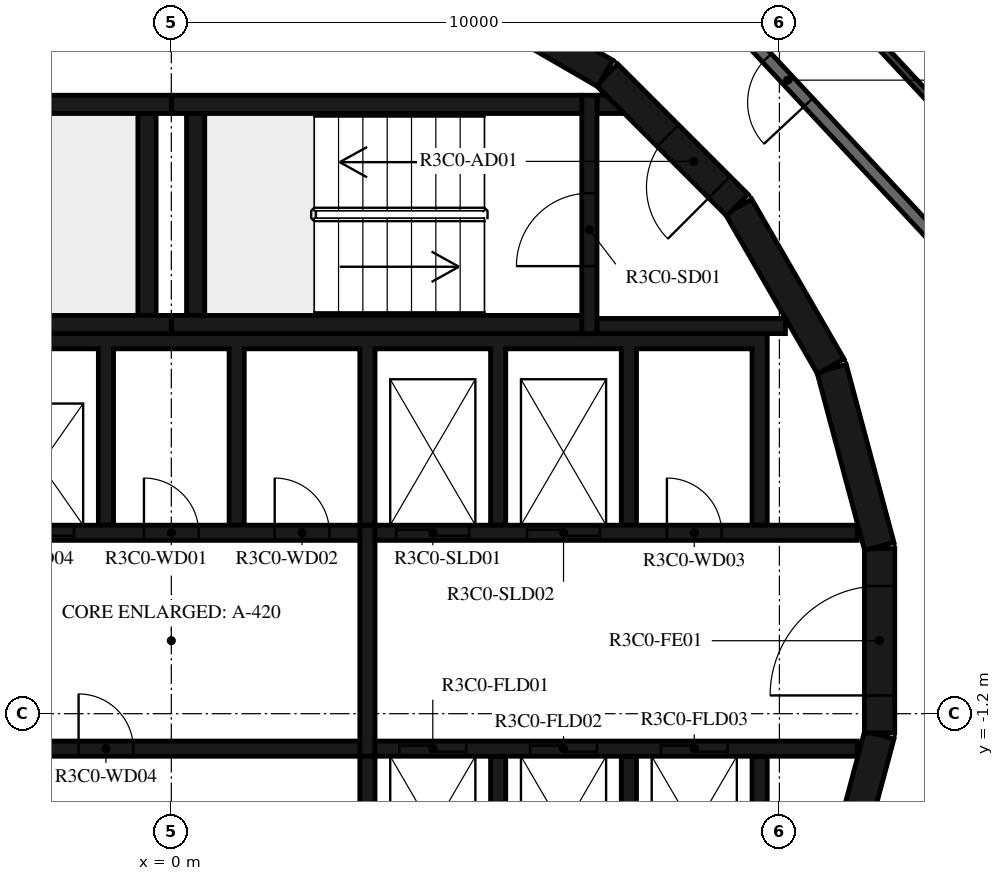
"""IFC4 building model, lengths in metres.
Left out: names, types, materials, properties, quantities, classifications, styles, units other than length and angle.
Written with IfcOpenShell. Run it as: python <this file> out.ifc"""

import sys

from ifc_helpers import new_model, si_unit, direction, frame, frame_2d, origin, place, context, subcontext, project, spatial, polyline, rectangle, outline, extrude, element, fill, save


model = new_model("IFC4")
c1 = context("Model", 3, precision=1e-05, world=origin(), true_north=direction((0.0, 1.0)))
c2 = subcontext(c1, "Body", "Model", "MODEL_VIEW")
j1 = project(units=[si_unit("LENGTHUNIT", "METRE"), si_unit("PLANEANGLEUNIT", "RADIAN")], contexts=[c1])
p1 = place(None, origin())
s1 = spatial("IfcSite", under=j1, at=p1, CompositionType="ELEMENT")
p2 = place(p1, origin())
s2 = spatial("IfcBuilding", under=s1, at=p2, CompositionType="ELEMENT")
p3 = place(p2, frame((0.0, 0.0, 134.4)))
s3 = spatial("IfcBuildingStorey", under=s2, at=p3, CompositionType="ELEMENT", Elevation=134.4)
p4 = place(p3, frame((10.858, -4.479, 0.0), z_axis=(0.0, 0.0, 1.0), x_axis=(0.258734743916, 0.965948410781, 0.0)))
e1 = element("IfcWall", 1, at=p4, inside=s3, PredefinedType="SHEAR", context=c2, shape_type="SweptSolid", body=[
    extrude(rectangle(XDim=3.033, YDim=0.5, at=frame_2d((1.516, 0.0))), origin(), (0.0, 0.0, 1.0), 3.12),
])
p5 = place(p3, frame((11.647, -1.516, 0.0), z_axis=(0.0, 0.0, 1.0), x_axis=(0.0, 1.0, 0.0)))
e2 = element("IfcWall", 2, at=p5, inside=s3, PredefinedType="SHEAR", context=c2, shape_type="SweptSolid", body=[
    extrude(rectangle(XDim=3.033, YDim=0.5, at=frame_2d((1.516, 0.0))), origin(), (0.0, 0.0, 1.0), 3.12),
])
p6 = place(p5, frame((0.616, 0.0, 0.0)))
e3 = element("IfcOpeningElement", 3, at=p6, cuts=e2, PredefinedType="OPENING", context=c2, shape_type="SweptSolid", body=[
    extrude(rectangle(XDim=1.8, YDim=2.1, at=frame_2d((0.9, 1.05))), frame((0.0, 0.26, 0.0), z_axis=(0.0, -1.0, 0.0), x_axis=(1.0, 0.0, 0.0)), (0.0, 0.0, 1.0), 0.52),
])
for number, where, z_axis, x_axis in (
    (4, (11.643, 1.55, 0.0), (0.0, 0.0, 1.0), (-0.259, 0.966, 0.0)),
    (5, (10.845, 4.51, 0.0), (0.0, 0.0, 1.0), (-0.5, 0.866, 0.0)),
):
    element("IfcWall", number, at=place(p3, frame(where, z_axis=z_axis, x_axis=x_axis)), inside=s3, PredefinedType="SHEAR", context=c2, shape_type="SweptSolid", body=[
        extrude(rectangle(XDim=3.033, YDim=0.5, at=frame_2d((1.516, 0.0))), origin(), (0.0, 0.0, 1.0), 3.12),
    ])
p7 = place(p3, frame((9.308, 7.164, 0.0), z_axis=(0.0, 0.0, 1.0), x_axis=(-0.707106781187, 0.707106781187, 0.0)))
e6 = element("IfcWall", 6, at=p7, inside=s3, PredefinedType="SHEAR", context=c2, shape_type="SweptSolid", body=[
    extrude(rectangle(XDim=3.032, YDim=0.5, at=frame_2d((1.516, 0.0))), origin(), (0.0, 0.0, 1.0), 3.12),
])
p8 = place(p7, frame((0.416, 0.0, 0.0)))
e7 = element("IfcOpeningElement", 7, at=p8, cuts=e6, PredefinedType="OPENING", context=c2, shape_type="SweptSolid", body=[
    extrude(rectangle(XDim=1.2, YDim=2.1, at=frame_2d((0.6, 1.05))), frame((0.0, 0.26, 0.0), z_axis=(0.0, -1.0, 0.0), x_axis=(1.0, 0.0, 0.0)), (0.0, 0.0, 1.0), 0.52),
])
p9 = place(p3, frame((7.137, 9.329, 0.0), z_axis=(0.0, 0.0, 1.0), x_axis=(-0.865975092491, 0.500087131594, 0.0)))
e8 = element("IfcWall", 8, at=p9, inside=s3, PredefinedType="SHEAR", context=c2, shape_type="SweptSolid", body=[
    extrude(rectangle(XDim=3.033, YDim=0.5, at=frame_2d((1.516, 0.0))), origin(), (0.0, 0.0, 1.0), 3.12),
])
for number, where, z_axis, x_axis in (
    (9, (0.0, 5.2, 0.0), (0.0, 0.0, 1.0), (1.0, 0.0, 0.0)),
    (10, (0.0, 8.82, 0.0), (0.0, 0.0, 1.0), (1.0, 0.0, 0.0)),
):
    element("IfcWall", number, at=place(p3, frame(where, z_axis=z_axis, x_axis=x_axis)), inside=s3, PredefinedType="SHEAR", context=c2, shape_type="SweptSolid", body=[
        extrude(rectangle(XDim=6.75, YDim=0.3, at=frame_2d((3.375, 0.0))), origin(), (0.0, 0.0, 1.0), 3.12),
    ])
p10 = place(p3, frame((0.4, 5.35, 0.0), z_axis=(0.0, 0.0, 1.0), x_axis=(0.0, 1.0, 0.0)))
e11 = element("IfcWall", 11, at=p10, inside=s3, PredefinedType="SHEAR", context=c2, shape_type="SweptSolid", body=[
    extrude(rectangle(XDim=3.32, YDim=0.3, at=frame_2d((1.66, 0.0))), origin(), (0.0, 0.0, 1.0), 3.12),
])
p11 = place(p3, frame((6.875, 5.05, 0.0), z_axis=(0.0, 0.0, 1.0), x_axis=(0.0, 1.0, 0.0)))
e12 = element("IfcWall", 12, at=p11, inside=s3, PredefinedType="SHEAR", context=c2, shape_type="SweptSolid", body=[
    extrude(rectangle(XDim=3.92, YDim=0.25, at=frame_2d((1.96, 0.0))), origin(), (0.0, 0.0, 1.0), 3.12),
])
p12 = place(p11, frame((1.11, 0.0, 0.0)))
e13 = element("IfcOpeningElement", 13, at=p12, cuts=e12, PredefinedType="OPENING", context=c2, shape_type="SweptSolid", body=[
    extrude(rectangle(XDim=1.2, YDim=2.1, at=frame_2d((0.6, 1.05))), frame((0.0, 0.135, 0.0), z_axis=(0.0, -1.0, 0.0), x_axis=(1.0, 0.0, 0.0)), (0.0, 0.0, 1.0), 0.27),
])
p13 = place(p3, frame((7.0, 5.175, 0.0), z_axis=(0.0, 0.0, 1.0), x_axis=(1.0, 0.0, 0.0)))
e14 = element("IfcWall", 14, at=p13, inside=s3, PredefinedType="SHEAR", context=c2, shape_type="SweptSolid", body=[
    extrude(rectangle(XDim=3.1, YDim=0.25, at=frame_2d((1.55, 0.0))), origin(), (0.0, 0.0, 1.0), 3.12),
])
p14 = place(p3, origin())
e15 = element("IfcWall", 15, at=p14, inside=s3, PredefinedType="SHEAR", context=c2, shape_type="SweptSolid", body=[
    extrude(outline(polyline([(7.448, 8.67), (7.0, 8.67), (7.0, 8.97), (7.148, 8.97), (7.448, 8.67)])), origin(), (0.0, 0.0, 1.0), 3.12),
])
for number, where, z_axis, x_axis in (
    (16, (-6.75, 5.2, 0.0), (0.0, 0.0, 1.0), (1.0, 0.0, 0.0)),
    (17, (-6.75, 8.82, 0.0), (0.0, 0.0, 1.0), (1.0, 0.0, 0.0)),
):
    element("IfcWall", number, at=place(p3, frame(where, z_axis=z_axis, x_axis=x_axis)), inside=s3, PredefinedType="SHEAR", context=c2, shape_type="SweptSolid", body=[
        extrude(rectangle(XDim=6.75, YDim=0.3, at=frame_2d((3.375, 0.0))), origin(), (0.0, 0.0, 1.0), 3.12),
    ])
p15 = place(p3, frame((-0.4, 5.35, 0.0), z_axis=(0.0, 0.0, 1.0), x_axis=(0.0, 1.0, 0.0)))
e18 = element("IfcWall", 18, at=p15, inside=s3, PredefinedType="SHEAR", context=c2, shape_type="SweptSolid", body=[
    extrude(rectangle(XDim=3.32, YDim=0.3, at=frame_2d((1.66, 0.0))), origin(), (0.0, 0.0, 1.0), 3.12),
])
p16 = place(p3, origin())
e19 = element("IfcWall", 19, at=p16, inside=s3, PredefinedType="SHEAR", context=c2, shape_type="SweptSolid", body=[
    extrude(outline(polyline([(-9.55, 4.8), (-7.65, 4.8), (-7.65, 1.9), (-7.4, 1.9), (-7.4, 4.8), (-5.5, 4.8), (-5.5, 1.9), (-5.25, 1.9), (-5.25, 4.8), (-3.35, 4.8), (-3.35, 1.9), (-3.1, 1.9), (-3.1, 4.8), (-1.2, 4.8), (-1.2, 1.9), (-0.95, 1.9), (-0.95, 4.8), (0.95, 4.8), (0.95, 1.9), (1.2, 1.9), (1.2, 4.8), (3.1, 4.8), (3.1, 1.9), (3.35, 1.9), (3.35, 4.8), (5.25, 4.8), (5.25, 1.9), (5.5, 1.9), (5.5, 4.8), (7.4, 4.8), (7.4, 1.9), (7.65, 1.9), (7.65, 4.8), (9.55, 4.8), (9.55, 1.9), (9.8, 1.9), (9.8, 4.8), (9.8, 5.05), (-9.8, 5.05), (-9.8, 4.8), (-9.8, 1.9), (-9.55, 1.9), (-9.55, 4.8)])), origin(), (0.0, 0.0, 1.0), 3.12),
])
p17 = place(p3, origin())
e20 = element("IfcWall", 20, at=p17, inside=s3, PredefinedType="SHEAR", context=c2, shape_type="SweptSolid", body=[
    extrude(outline(polyline([(9.8, -5.05), (9.8, -4.8), (9.8, -1.9), (9.55, -1.9), (9.55, -4.8), (7.65, -4.8), (7.65, -1.9), (7.4, -1.9), (7.4, -4.8), (5.5, -4.8), (5.5, -1.9), (5.25, -1.9), (5.25, -4.8), (3.35, -4.8), (3.35, -1.9), (3.1, -1.9), (3.1, -4.8), (-5.25, -4.8), (-5.25, -1.9), (-5.5, -1.9), (-5.5, -4.8), (-7.4, -4.8), (-7.4, -1.9), (-7.65, -1.9), (-7.65, -4.8), (-9.55, -4.8), (-9.55, -1.9), (-9.8, -1.9), (-9.8, -4.8), (-9.8, -5.05), (9.8, -5.05)])), origin(), (0.0, 0.0, 1.0), 3.12),
])
p18 = place(p3, frame((-11.28, 1.775, 0.0), z_axis=(0.0, 0.0, 1.0), x_axis=(1.0, 0.0, 0.0)))
e21 = element("IfcWall", 21, at=p18, inside=s3, PredefinedType="SHEAR", context=c2, shape_type="SweptSolid", body=[
    extrude(rectangle(XDim=14.38, YDim=0.25, at=frame_2d((7.19, 0.0))), origin(), (0.0, 0.0, 1.0), 3.12),
])
p19 = place(p18, frame((2.13, 0.0, 0.0)))
e22 = element("IfcOpeningElement", 22, at=p19, cuts=e21, PredefinedType="OPENING", context=c2, shape_type="SweptSolid", body=[
    extrude(rectangle(XDim=1.1, YDim=2.1, at=frame_2d((0.55, 1.05))), frame((0.0, 0.135, 0.0), z_axis=(0.0, -1.0, 0.0), x_axis=(1.0, 0.0, 0.0)), (0.0, 0.0, 1.0), 0.27),
])
p20 = place(p18, frame((4.28, 0.0, 0.0)))
e23 = element("IfcOpeningElement", 23, at=p20, cuts=e21, PredefinedType="OPENING", context=c2, shape_type="SweptSolid", body=[
    extrude(rectangle(XDim=1.1, YDim=2.1, at=frame_2d((0.55, 1.05))), frame((0.0, 0.135, 0.0), z_axis=(0.0, -1.0, 0.0), x_axis=(1.0, 0.0, 0.0)), (0.0, 0.0, 1.0), 0.27),
])
p21 = place(p18, frame((6.43, 0.0, 0.0)))
e24 = element("IfcOpeningElement", 24, at=p21, cuts=e21, PredefinedType="OPENING", context=c2, shape_type="SweptSolid", body=[
    extrude(rectangle(XDim=1.1, YDim=2.1, at=frame_2d((0.55, 1.05))), frame((0.0, 0.135, 0.0), z_axis=(0.0, -1.0, 0.0), x_axis=(1.0, 0.0, 0.0)), (0.0, 0.0, 1.0), 0.27),
])
p22 = place(p18, frame((8.58, 0.0, 0.0)))
e25 = element("IfcOpeningElement", 25, at=p22, cuts=e21, PredefinedType="OPENING", context=c2, shape_type="SweptSolid", body=[
    extrude(rectangle(XDim=1.1, YDim=2.1, at=frame_2d((0.55, 1.05))), frame((0.0, 0.135, 0.0), z_axis=(0.0, -1.0, 0.0), x_axis=(1.0, 0.0, 0.0)), (0.0, 0.0, 1.0), 0.27),
])
p23 = place(p18, frame((10.83, 0.0, 0.0)))
e26 = element("IfcOpeningElement", 26, at=p23, cuts=e21, PredefinedType="OPENING", context=c2, shape_type="SweptSolid", body=[
    extrude(rectangle(XDim=0.9, YDim=2.1, at=frame_2d((0.45, 1.05))), frame((0.0, 0.135, 0.0), z_axis=(0.0, -1.0, 0.0), x_axis=(1.0, 0.0, 0.0)), (0.0, 0.0, 1.0), 0.27),
])
p24 = place(p18, frame((12.98, 0.0, 0.0)))
e27 = element("IfcOpeningElement", 27, at=p24, cuts=e21, PredefinedType="OPENING", context=c2, shape_type="SweptSolid", body=[
    extrude(rectangle(XDim=0.9, YDim=2.1, at=frame_2d((0.45, 1.05))), frame((0.0, 0.135, 0.0), z_axis=(0.0, -1.0, 0.0), x_axis=(1.0, 0.0, 0.0)), (0.0, 0.0, 1.0), 0.27),
])
p25 = place(p3, frame((3.35, 1.775, 0.0), z_axis=(0.0, 0.0, 1.0), x_axis=(1.0, 0.0, 0.0)))
e28 = element("IfcWall", 28, at=p25, inside=s3, PredefinedType="SHEAR", context=c2, shape_type="SweptSolid", body=[
    extrude(rectangle(XDim=7.93, YDim=0.25, at=frame_2d((3.965, 0.0))), origin(), (0.0, 0.0, 1.0), 3.12),
])
p26 = place(p25, frame((0.35, 0.0, 0.0)))
e29 = element("IfcOpeningElement", 29, at=p26, cuts=e28, PredefinedType="OPENING", context=c2, shape_type="SweptSolid", body=[
    extrude(rectangle(XDim=1.2, YDim=2.4, at=frame_2d((0.6, 1.2))), frame((0.0, 0.135, 0.0), z_axis=(0.0, -1.0, 0.0), x_axis=(1.0, 0.0, 0.0)), (0.0, 0.0, 1.0), 0.27),
])
p27 = place(p25, frame((2.5, 0.0, 0.0)))
e30 = element("IfcOpeningElement", 30, at=p27, cuts=e28, PredefinedType="OPENING", context=c2, shape_type="SweptSolid", body=[
    extrude(rectangle(XDim=1.2, YDim=2.4, at=frame_2d((0.6, 1.2))), frame((0.0, 0.135, 0.0), z_axis=(0.0, -1.0, 0.0), x_axis=(1.0, 0.0, 0.0)), (0.0, 0.0, 1.0), 0.27),
])
p28 = place(p25, frame((4.8, 0.0, 0.0)))
e31 = element("IfcOpeningElement", 31, at=p28, cuts=e28, PredefinedType="OPENING", context=c2, shape_type="SweptSolid", body=[
    extrude(rectangle(XDim=0.9, YDim=2.1, at=frame_2d((0.45, 1.05))), frame((0.0, 0.135, 0.0), z_axis=(0.0, -1.0, 0.0), x_axis=(1.0, 0.0, 0.0)), (0.0, 0.0, 1.0), 0.27),
])
p29 = place(p3, frame((-11.28, -1.775, 0.0), z_axis=(0.0, 0.0, 1.0), x_axis=(1.0, 0.0, 0.0)))
e32 = element("IfcWall", 32, at=p29, inside=s3, PredefinedType="SHEAR", context=c2, shape_type="SweptSolid", body=[
    extrude(rectangle(XDim=14.38, YDim=0.25, at=frame_2d((7.19, 0.0))), origin(), (0.0, 0.0, 1.0), 3.12),
])
p30 = place(p29, frame((9.755, 0.0, 0.0)))
e33 = element("IfcOpeningElement", 33, at=p30, cuts=e32, PredefinedType="OPENING", context=c2, shape_type="SweptSolid", body=[
    extrude(rectangle(XDim=0.9, YDim=2.1, at=frame_2d((0.45, 1.05))), frame((0.0, 0.135, 0.0), z_axis=(0.0, -1.0, 0.0), x_axis=(1.0, 0.0, 0.0)), (0.0, 0.0, 1.0), 0.27),
])
p31 = place(p3, frame((3.35, -1.775, 0.0), z_axis=(0.0, 0.0, 1.0), x_axis=(1.0, 0.0, 0.0)))
e34 = element("IfcWall", 34, at=p31, inside=s3, PredefinedType="SHEAR", context=c2, shape_type="SweptSolid", body=[
    extrude(rectangle(XDim=7.93, YDim=0.25, at=frame_2d((3.965, 0.0))), origin(), (0.0, 0.0, 1.0), 3.12),
])
p32 = place(p31, frame((0.4, 0.0, 0.0)))
e35 = element("IfcOpeningElement", 35, at=p32, cuts=e34, PredefinedType="OPENING", context=c2, shape_type="SweptSolid", body=[
    extrude(rectangle(XDim=1.1, YDim=2.4, at=frame_2d((0.55, 1.2))), frame((0.0, 0.135, 0.0), z_axis=(0.0, -1.0, 0.0), x_axis=(1.0, 0.0, 0.0)), (0.0, 0.0, 1.0), 0.27),
])
p33 = place(p31, frame((2.55, 0.0, 0.0)))
e36 = element("IfcOpeningElement", 36, at=p33, cuts=e34, PredefinedType="OPENING", context=c2, shape_type="SweptSolid", body=[
    extrude(rectangle(XDim=1.1, YDim=2.4, at=frame_2d((0.55, 1.2))), frame((0.0, 0.135, 0.0), z_axis=(0.0, -1.0, 0.0), x_axis=(1.0, 0.0, 0.0)), (0.0, 0.0, 1.0), 0.27),
])
p34 = place(p31, frame((4.7, 0.0, 0.0)))
e37 = element("IfcOpeningElement", 37, at=p34, cuts=e34, PredefinedType="OPENING", context=c2, shape_type="SweptSolid", body=[
    extrude(rectangle(XDim=1.1, YDim=2.4, at=frame_2d((0.55, 1.2))), frame((0.0, 0.135, 0.0), z_axis=(0.0, -1.0, 0.0), x_axis=(1.0, 0.0, 0.0)), (0.0, 0.0, 1.0), 0.27),
])
p35 = place(p3, frame((3.225, -1.9, 0.0), z_axis=(0.0, 0.0, 1.0), x_axis=(0.0, 1.0, 0.0)))
e38 = element("IfcWall", 38, at=p35, inside=s3, PredefinedType="SHEAR", context=c2, shape_type="SweptSolid", body=[
    extrude(rectangle(XDim=3.8, YDim=0.25, at=frame_2d((1.9, 0.0))), origin(), (0.0, 0.0, 1.0), 3.12),
])
p36 = place(p3, frame((12.028, -7.516, 0.0), z_axis=(0.0, 0.0, 1.0), x_axis=(0.292365533182, 0.956306642771, 0.0)))
e39 = element("IfcWall", 39, at=p36, inside=s3, PredefinedType="STANDARD", context=c2, shape_type="SweptSolid", body=[
    extrude(rectangle(XDim=7.342, YDim=0.2, at=frame_2d((3.671, 0.0))), origin(), (0.0, 0.0, 1.0), 3.12),
])
p37 = place(p3, frame((12.523, 6.659, 0.0), z_axis=(0.0, 0.0, 1.0), x_axis=(-0.682001841105, 0.731350455479, 0.0)))
e40 = element("IfcWall", 40, at=p37, inside=s3, PredefinedType="STANDARD", context=c2, shape_type="SweptSolid", body=[
    extrude(rectangle(XDim=7.342, YDim=0.2, at=frame_2d((3.671, 0.0))), origin(), (0.0, 0.0, 1.0), 3.12),
])
p38 = place(p37, frame((3.0, 0.0, 0.0)))
e41 = element("IfcOpeningElement", 41, at=p38, cuts=e40, PredefinedType="OPENING", context=c2, shape_type="SweptSolid", body=[
    extrude(rectangle(XDim=1.0, YDim=2.1, at=frame_2d((0.5, 1.05))), frame((0.0, 0.11, 0.0), z_axis=(0.0, -1.0, 0.0), x_axis=(1.0, 0.0, 0.0)), (0.0, 0.0, 1.0), 0.22),
])
p39 = place(p37, frame((5.209, 0.0, 0.0)))
e42 = element("IfcOpeningElement", 42, at=p39, cuts=e40, PredefinedType="OPENING", context=c2, shape_type="SweptSolid", body=[
    extrude(rectangle(XDim=1.0, YDim=2.1, at=frame_2d((0.5, 1.05))), frame((0.0, 0.11, 0.0), z_axis=(0.0, -1.0, 0.0), x_axis=(1.0, 0.0, 0.0)), (0.0, 0.0, 1.0), 0.22),
])
p40 = place(p3, frame((13.894, 7.388, 0.0), z_axis=(0.0, 0.0, 1.0), x_axis=(-0.681994622729, 0.731357186721, 0.0)))
e43 = element("IfcWall", 43, at=p40, inside=s3, PredefinedType="PARTITIONING", context=c2, shape_type="SweptSolid", body=[
    extrude(rectangle(XDim=8.146, YDim=0.12, at=frame_2d((4.073, 0.0))), origin(), (0.0, 0.0, 1.0), 3.12),
])
p41 = place(p40, frame((0.2, 0.0, 0.0)))
e44 = element("IfcOpeningElement", 44, at=p41, cuts=e43, PredefinedType="OPENING", context=c2, shape_type="SweptSolid", body=[
    extrude(rectangle(XDim=0.9, YDim=2.1, at=frame_2d((0.45, 1.05))), frame((0.0, 0.07, 0.0), z_axis=(0.0, -1.0, 0.0), x_axis=(1.0, 0.0, 0.0)), (0.0, 0.0, 1.0), 0.14),
])
p42 = place(p12, origin())
e45 = element("IfcDoor", 45, at=p42, inside=s3, OperationType="SINGLE_SWING_LEFT", PredefinedType="DOOR", context=c2, shape_type="SweptSolid", body=[
    extrude(rectangle(XDim=1.2, YDim=2.1, at=frame_2d((0.6, 1.05))), frame((0.0, 0.025, 0.0), z_axis=(0.0, -1.0, 0.0), x_axis=(1.0, 0.0, 0.0)), (0.0, 0.0, 1.0), 0.05),
])
fill(e13, e45)
p43 = place(p8, origin())
e46 = element("IfcDoor", 46, at=p43, inside=s3, OperationType="SINGLE_SWING_RIGHT", PredefinedType="DOOR", context=c2, shape_type="SweptSolid", body=[
    extrude(rectangle(XDim=1.2, YDim=2.1, at=frame_2d((0.6, 1.05))), frame((0.0, 0.025, 0.0), z_axis=(0.0, -1.0, 0.0), x_axis=(1.0, 0.0, 0.0)), (0.0, 0.0, 1.0), 0.05),
])
fill(e7, e46)
p44 = place(p6, origin())
e47 = element("IfcDoor", 47, at=p44, inside=s3, OperationType="DOUBLE_DOOR_SINGLE_SWING", PredefinedType="DOOR", context=c2, shape_type="SweptSolid", body=[
    extrude(rectangle(XDim=1.8, YDim=2.1, at=frame_2d((0.9, 1.05))), frame((0.0, 0.025, 0.0), z_axis=(0.0, -1.0, 0.0), x_axis=(1.0, 0.0, 0.0)), (0.0, 0.0, 1.0), 0.05),
])
fill(e3, e47)
p45 = place(p22, origin())
e48 = element("IfcDoor", 48, at=p45, inside=s3, OperationType="DOUBLE_DOOR_SLIDING", PredefinedType="DOOR", context=c2, shape_type="SweptSolid", body=[
    extrude(rectangle(XDim=1.1, YDim=2.1, at=frame_2d((0.55, 1.05))), frame((0.0, 0.025, 0.0), z_axis=(0.0, -1.0, 0.0), x_axis=(1.0, 0.0, 0.0)), (0.0, 0.0, 1.0), 0.05),
])
fill(e25, e48)
p46 = place(p26, origin())
e49 = element("IfcDoor", 49, at=p46, inside=s3, OperationType="DOUBLE_DOOR_SLIDING", PredefinedType="DOOR", context=c2, shape_type="SweptSolid", body=[
    extrude(rectangle(XDim=1.2, YDim=2.4, at=frame_2d((0.6, 1.2))), frame((0.0, 0.025, 0.0), z_axis=(0.0, -1.0, 0.0), x_axis=(1.0, 0.0, 0.0)), (0.0, 0.0, 1.0), 0.05),
])
fill(e29, e49)
p47 = place(p27, origin())
e50 = element("IfcDoor", 50, at=p47, inside=s3, OperationType="DOUBLE_DOOR_SLIDING", PredefinedType="DOOR", context=c2, shape_type="SweptSolid", body=[
    extrude(rectangle(XDim=1.2, YDim=2.4, at=frame_2d((0.6, 1.2))), frame((0.0, 0.025, 0.0), z_axis=(0.0, -1.0, 0.0), x_axis=(1.0, 0.0, 0.0)), (0.0, 0.0, 1.0), 0.05),
])
fill(e30, e50)
p48 = place(p32, origin())
e51 = element("IfcDoor", 51, at=p48, inside=s3, OperationType="DOUBLE_DOOR_SLIDING", PredefinedType="DOOR", context=c2, shape_type="SweptSolid", body=[
    extrude(rectangle(XDim=1.1, YDim=2.4, at=frame_2d((0.55, 1.2))), frame((0.0, 0.025, 0.0), z_axis=(0.0, -1.0, 0.0), x_axis=(1.0, 0.0, 0.0)), (0.0, 0.0, 1.0), 0.05),
])
fill(e35, e51)
p49 = place(p33, origin())
e52 = element("IfcDoor", 52, at=p49, inside=s3, OperationType="DOUBLE_DOOR_SLIDING", PredefinedType="DOOR", context=c2, shape_type="SweptSolid", body=[
    extrude(rectangle(XDim=1.1, YDim=2.4, at=frame_2d((0.55, 1.2))), frame((0.0, 0.025, 0.0), z_axis=(0.0, -1.0, 0.0), x_axis=(1.0, 0.0, 0.0)), (0.0, 0.0, 1.0), 0.05),
])
fill(e36, e52)
p50 = place(p34, origin())
e53 = element("IfcDoor", 53, at=p50, inside=s3, OperationType="DOUBLE_DOOR_SLIDING", PredefinedType="DOOR", context=c2, shape_type="SweptSolid", body=[
    extrude(rectangle(XDim=1.1, YDim=2.4, at=frame_2d((0.55, 1.2))), frame((0.0, 0.025, 0.0), z_axis=(0.0, -1.0, 0.0), x_axis=(1.0, 0.0, 0.0)), (0.0, 0.0, 1.0), 0.05),
])
fill(e37, e53)
p51 = place(p23, origin())
e54 = element("IfcDoor", 54, at=p51, inside=s3, OperationType="SINGLE_SWING_RIGHT", PredefinedType="DOOR", context=c2, shape_type="SweptSolid", body=[
    extrude(rectangle(XDim=0.9, YDim=2.1, at=frame_2d((0.45, 1.05))), frame((0.0, 0.025, 0.0), z_axis=(0.0, -1.0, 0.0), x_axis=(1.0, 0.0, 0.0)), (0.0, 0.0, 1.0), 0.05),
])
fill(e26, e54)
p52 = place(p24, origin())
e55 = element("IfcDoor", 55, at=p52, inside=s3, OperationType="SINGLE_SWING_LEFT", PredefinedType="DOOR", context=c2, shape_type="SweptSolid", body=[
    extrude(rectangle(XDim=0.9, YDim=2.1, at=frame_2d((0.45, 1.05))), frame((0.0, 0.025, 0.0), z_axis=(0.0, -1.0, 0.0), x_axis=(1.0, 0.0, 0.0)), (0.0, 0.0, 1.0), 0.05),
])
fill(e27, e55)
p53 = place(p28, origin())
e56 = element("IfcDoor", 56, at=p53, inside=s3, OperationType="SINGLE_SWING_RIGHT", PredefinedType="DOOR", context=c2, shape_type="SweptSolid", body=[
    extrude(rectangle(XDim=0.9, YDim=2.1, at=frame_2d((0.45, 1.05))), frame((0.0, 0.025, 0.0), z_axis=(0.0, -1.0, 0.0), x_axis=(1.0, 0.0, 0.0)), (0.0, 0.0, 1.0), 0.05),
])
fill(e31, e56)
p54 = place(p30, origin())
e57 = element("IfcDoor", 57, at=p54, inside=s3, OperationType="SINGLE_SWING_LEFT", PredefinedType="DOOR", context=c2, shape_type="SweptSolid", body=[
    extrude(rectangle(XDim=0.9, YDim=2.1, at=frame_2d((0.45, 1.05))), frame((0.0, 0.025, 0.0), z_axis=(0.0, -1.0, 0.0), x_axis=(1.0, 0.0, 0.0)), (0.0, 0.0, 1.0), 0.05),
])
fill(e33, e57)
p55 = place(p38, origin())
e58 = element("IfcDoor", 58, at=p55, inside=s3, OperationType="SINGLE_SWING_LEFT", PredefinedType="DOOR", context=c2, shape_type="SweptSolid", body=[
    extrude(rectangle(XDim=1.0, YDim=2.1, at=frame_2d((0.5, 1.05))), frame((0.0, 0.025, 0.0), z_axis=(0.0, -1.0, 0.0), x_axis=(1.0, 0.0, 0.0)), (0.0, 0.0, 1.0), 0.05),
])
fill(e41, e58)
save(model, sys.argv[1])
